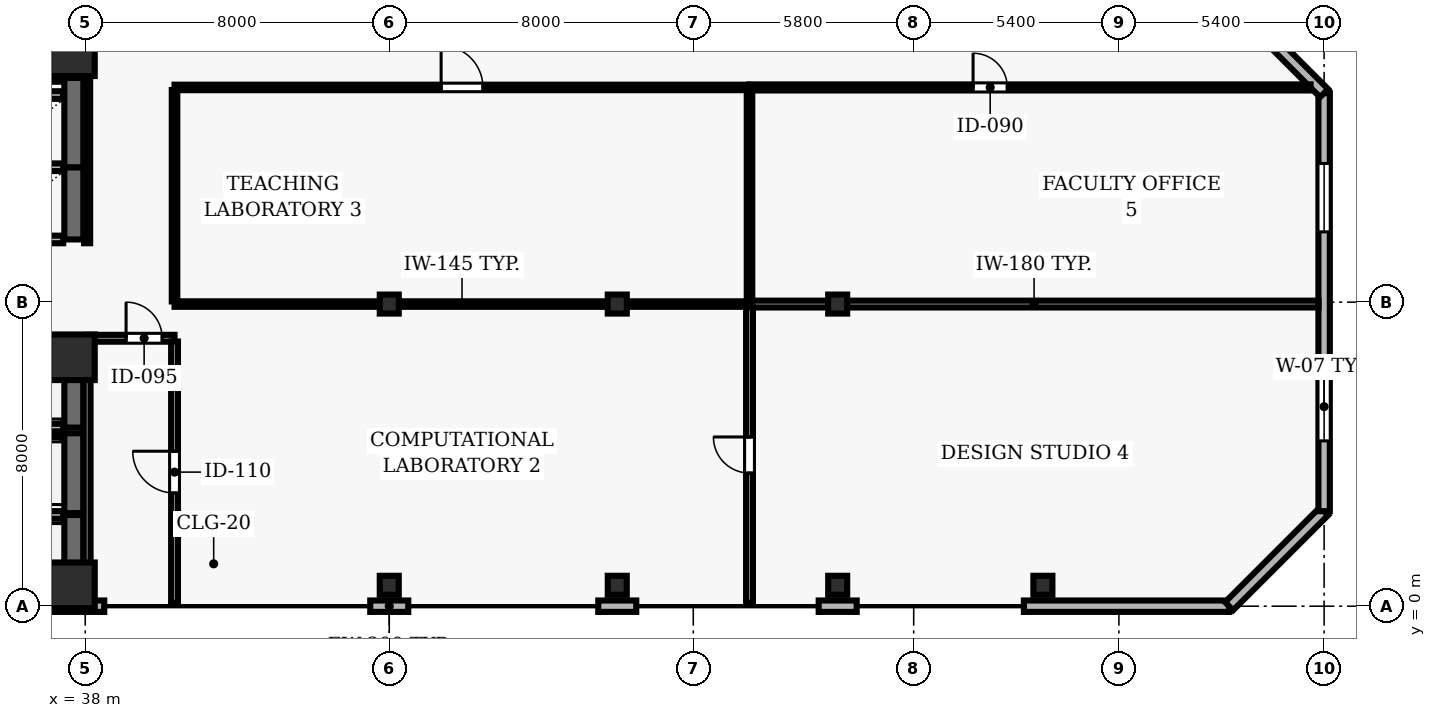
"""IFC4 building model, lengths in metres.
Left out: names, types, materials, properties, quantities, classifications, styles, units other than length and angle.
Written with IfcOpenShell. Run it as: python <this file> out.ifc"""

import sys

from ifc_helpers import new_model, si_unit, direction, frame, frame_2d, origin, origin_2d, place, context, subcontext, project, spatial, rectangle, hollow_rectangle, extrude, element, fill, save


model = new_model("IFC4")
c1 = context("Model", 3, precision=1e-05, world=origin(), true_north=direction((0.0, 1.0)))
c2 = subcontext(c1, "Body", "Model", "MODEL_VIEW")
j1 = project(units=[si_unit("LENGTHUNIT", "METRE"), si_unit("PLANEANGLEUNIT", "RADIAN")], contexts=[c1])
p1 = place(None, origin())
s1 = spatial("IfcSite", under=j1, at=p1, CompositionType="ELEMENT")
p2 = place(p1, origin())
s2 = spatial("IfcBuilding", under=s1, at=p2, CompositionType="ELEMENT")
p3 = place(p2, frame((0.0, 0.0, 119.0)))
s3 = spatial("IfcBuildingStorey", under=s2, at=p3, CompositionType="ELEMENT", Elevation=119.0)
for number, where, z_axis, x_axis in (
    (1, (37.65, 0.55, 0.0), (0.0, 0.0, 1.0), (1.0, 0.0, 0.0)),
    (2, (37.65, 6.55, 0.0), (0.0, 0.0, 1.0), (1.0, 0.0, 0.0)),
    (3, (37.65, 14.55, 0.0), (0.0, 0.0, 1.0), (1.0, 0.0, 0.0)),
):
    element("IfcColumn", number, at=place(p3, frame(where, z_axis=z_axis, x_axis=x_axis)), inside=s3, PredefinedType="COLUMN", context=c2, shape_type="SweptSolid", body=[
        extrude(rectangle(XDim=1.2, YDim=1.2, at=origin_2d()), origin(), (0.0, 0.0, 1.0), 3.9),
    ])
for number, where, z_axis, x_axis in (
    (4, (46.0, 0.55, 0.0), (0.0, 0.0, 1.0), (1.0, 0.0, 0.0)),
    (5, (46.0, 7.95, 0.0), (0.0, 0.0, 1.0), (1.0, 0.0, 0.0)),
    (6, (52.0, 0.55, 0.0), (0.0, 0.0, 1.0), (1.0, 0.0, 0.0)),
    (7, (52.0, 7.95, 0.0), (0.0, 0.0, 1.0), (1.0, 0.0, 0.0)),
    (8, (57.8, 0.55, 0.0), (0.0, 0.0, 1.0), (1.0, 0.0, 0.0)),
    (9, (57.8, 7.95, 0.0), (0.0, 0.0, 1.0), (1.0, 0.0, 0.0)),
    (10, (63.2, 0.55, 0.0), (0.0, 0.0, 1.0), (1.0, 0.0, 0.0)),
):
    element("IfcColumn", number, at=place(p3, frame(where, z_axis=z_axis, x_axis=x_axis)), inside=s3, PredefinedType="COLUMN", context=c2, shape_type="SweptSolid", body=[
        extrude(hollow_rectangle(XDim=0.5, YDim=0.5, WallThickness=0.025, at=origin_2d()), origin(), (0.0, 0.0, 1.0), 3.9),
    ])
p4 = place(p3, frame((30.9, 0.0, 0.0), z_axis=(0.0, 0.0, 1.0), x_axis=(1.0, 0.0, 0.0)))
e11 = element("IfcWall", 11, at=p4, inside=s3, PredefinedType="SOLIDWALL", context=c2, shape_type="SweptSolid", body=[
    extrude(rectangle(XDim=7.6, YDim=0.3, at=frame_2d((3.8, 0.0))), origin(), (0.0, 0.0, 1.0), 3.69),
])
for number, where, z_axis, x_axis in (
    (12, (45.5, 0.0, 0.0), (0.0, 0.0, 1.0), (1.0, 0.0, 0.0)),
    (13, (51.5, 0.0, 0.0), (0.0, 0.0, 1.0), (1.0, 0.0, 0.0)),
    (14, (57.3, 0.0, 0.0), (0.0, 0.0, 1.0), (1.0, 0.0, 0.0)),
):
    element("IfcWall", number, at=place(p3, frame(where, z_axis=z_axis, x_axis=x_axis)), inside=s3, PredefinedType="SOLIDWALL", context=c2, shape_type="SweptSolid", body=[
        extrude(rectangle(XDim=1.0, YDim=0.3, at=frame_2d((0.5, 0.0))), origin(), (0.0, 0.0, 1.0), 3.69),
    ])
p5 = place(p3, frame((62.7, 0.0, 0.0), z_axis=(0.0, 0.0, 1.0), x_axis=(1.0, 0.0, 0.0)))
e15 = element("IfcWall", 15, at=p5, inside=s3, PredefinedType="SOLIDWALL", context=c2, shape_type="SweptSolid", body=[
    extrude(rectangle(XDim=5.4, YDim=0.3, at=frame_2d((2.7, 0.0))), origin(), (0.0, 0.0, 1.0), 3.69),
])
p6 = place(p3, frame((68.1, 0.0, 0.0), z_axis=(0.0, 0.0, 1.0), x_axis=(0.707106781187, 0.707106781187, 0.0)))
e16 = element("IfcWall", 16, at=p6, inside=s3, PredefinedType="SOLIDWALL", context=c2, shape_type="SweptSolid", body=[
    extrude(rectangle(XDim=3.536, YDim=0.3, at=frame_2d((1.768, 0.0))), origin(), (0.0, 0.0, 1.0), 3.69),
])
p7 = place(p3, frame((70.6, 2.5, 0.0), z_axis=(0.0, 0.0, 1.0), x_axis=(0.0, 1.0, 0.0)))
e17 = element("IfcWall", 17, at=p7, inside=s3, PredefinedType="SOLIDWALL", context=c2, shape_type="SweptSolid", body=[
    extrude(rectangle(XDim=11.0, YDim=0.3, at=frame_2d((5.5, 0.0))), origin(), (0.0, 0.0, 1.0), 3.69),
])
p8 = place(p7, frame((1.85, 0.0, 0.9)))
e18 = element("IfcOpeningElement", 18, at=p8, cuts=e17, PredefinedType="OPENING", context=c2, shape_type="SweptSolid", body=[
    extrude(rectangle(XDim=1.8, YDim=1.8, at=frame_2d((0.9, 0.9))), frame((0.0, 0.16, 0.0), z_axis=(0.0, -1.0, 0.0), x_axis=(1.0, 0.0, 0.0)), (0.0, 0.0, 1.0), 0.32),
])
p9 = place(p7, frame((7.35, 0.0, 0.9)))
e19 = element("IfcOpeningElement", 19, at=p9, cuts=e17, PredefinedType="OPENING", context=c2, shape_type="SweptSolid", body=[
    extrude(rectangle(XDim=1.8, YDim=1.8, at=frame_2d((0.9, 0.9))), frame((0.0, 0.16, 0.0), z_axis=(0.0, -1.0, 0.0), x_axis=(1.0, 0.0, 0.0)), (0.0, 0.0, 1.0), 0.32),
])
p10 = place(p3, frame((70.6, 13.5, 0.0), z_axis=(0.0, 0.0, 1.0), x_axis=(-0.707106781187, 0.707106781187, 0.0)))
e20 = element("IfcWall", 20, at=p10, inside=s3, PredefinedType="SOLIDWALL", context=c2, shape_type="SweptSolid", body=[
    extrude(rectangle(XDim=3.536, YDim=0.3, at=frame_2d((1.768, 0.0))), origin(), (0.0, 0.0, 1.0), 3.69),
])
p11 = place(p3, frame((37.7, 0.3, 0.0), z_axis=(0.0, 0.0, 1.0), x_axis=(0.0, 1.0, 0.0)))
e21 = element("IfcWall", 21, at=p11, inside=s3, PredefinedType="SHEAR", context=c2, shape_type="SweptSolid", body=[
    extrude(rectangle(XDim=2.1, YDim=0.5, at=frame_2d((1.05, 0.0))), origin(), (0.0, 0.0, 1.0), 3.69),
])
for number, where, z_axis, x_axis in (
    (22, (35.28, 0.3, 0.0), (0.0, 0.0, 1.0), (1.0, 0.0, 0.0)),
    (23, (37.42, 2.4, 0.0), (0.0, 0.0, 1.0), (-1.0, 0.0, 0.0)),
):
    element("IfcWall", number, at=place(p3, frame(where, z_axis=z_axis, x_axis=x_axis)), inside=s3, PredefinedType="SOLIDWALL", context=c2, shape_type="SweptSolid", body=[
        extrude(rectangle(XDim=2.14, YDim=0.2, at=frame_2d((1.07, 0.0))), origin(), (0.0, 0.0, 1.0), 3.69),
    ])
p12 = place(p3, frame((37.7, 2.45, 0.0), z_axis=(0.0, 0.0, 1.0), x_axis=(0.0, 1.0, 0.0)))
e24 = element("IfcWall", 24, at=p12, inside=s3, PredefinedType="SHEAR", context=c2, shape_type="SweptSolid", body=[
    extrude(rectangle(XDim=2.1, YDim=0.5, at=frame_2d((1.05, 0.0))), origin(), (0.0, 0.0, 1.0), 3.69),
])
p13 = place(p3, frame((37.42, 4.55, 0.0), z_axis=(0.0, 0.0, 1.0), x_axis=(-1.0, 0.0, 0.0)))
e25 = element("IfcWall", 25, at=p13, inside=s3, PredefinedType="SOLIDWALL", context=c2, shape_type="SweptSolid", body=[
    extrude(rectangle(XDim=2.14, YDim=0.2, at=frame_2d((1.07, 0.0))), origin(), (0.0, 0.0, 1.0), 3.69),
])
p14 = place(p3, frame((37.7, 4.7, 0.0), z_axis=(0.0, 0.0, 1.0), x_axis=(0.0, 1.0, 0.0)))
e26 = element("IfcWall", 26, at=p14, inside=s3, PredefinedType="SHEAR", context=c2, shape_type="SweptSolid", body=[
    extrude(rectangle(XDim=2.25, YDim=0.5, at=frame_2d((1.125, 0.0))), origin(), (0.0, 0.0, 1.0), 3.69),
])
for number, where, z_axis, x_axis in (
    (27, (35.28, 4.7, 0.0), (0.0, 0.0, 1.0), (1.0, 0.0, 0.0)),
    (28, (37.42, 6.95, 0.0), (0.0, 0.0, 1.0), (-1.0, 0.0, 0.0)),
):
    element("IfcWall", number, at=place(p3, frame(where, z_axis=z_axis, x_axis=x_axis)), inside=s3, PredefinedType="SOLIDWALL", context=c2, shape_type="SweptSolid", body=[
        extrude(rectangle(XDim=2.14, YDim=0.2, at=frame_2d((1.07, 0.0))), origin(), (0.0, 0.0, 1.0), 3.69),
    ])
p15 = place(p3, frame((37.7, 9.65, 0.0), z_axis=(0.0, 0.0, 1.0), x_axis=(0.0, 1.0, 0.0)))
e29 = element("IfcWall", 29, at=p15, inside=s3, PredefinedType="SHEAR", context=c2, shape_type="SweptSolid", body=[
    extrude(rectangle(XDim=1.9, YDim=0.5, at=frame_2d((0.95, 0.0))), origin(), (0.0, 0.0, 1.0), 3.69),
])
for number, where, z_axis, x_axis in (
    (30, (35.28, 9.65, 0.0), (0.0, 0.0, 1.0), (1.0, 0.0, 0.0)),
    (31, (37.42, 11.55, 0.0), (0.0, 0.0, 1.0), (-1.0, 0.0, 0.0)),
):
    element("IfcWall", number, at=place(p3, frame(where, z_axis=z_axis, x_axis=x_axis)), inside=s3, PredefinedType="SOLIDWALL", context=c2, shape_type="SweptSolid", body=[
        extrude(rectangle(XDim=2.14, YDim=0.2, at=frame_2d((1.07, 0.0))), origin(), (0.0, 0.0, 1.0), 3.69),
    ])
p16 = place(p3, frame((37.7, 11.55, 0.0), z_axis=(0.0, 0.0, 1.0), x_axis=(0.0, 1.0, 0.0)))
e32 = element("IfcWall", 32, at=p16, inside=s3, PredefinedType="SHEAR", context=c2, shape_type="SweptSolid", body=[
    extrude(rectangle(XDim=2.35, YDim=0.5, at=frame_2d((1.175, 0.0))), origin(), (0.0, 0.0, 1.0), 3.69),
])
p17 = place(p3, frame((37.42, 13.45, 0.0), z_axis=(0.0, 0.0, 1.0), x_axis=(-1.0, 0.0, 0.0)))
e33 = element("IfcWall", 33, at=p17, inside=s3, PredefinedType="SOLIDWALL", context=c2, shape_type="SweptSolid", body=[
    extrude(rectangle(XDim=2.14, YDim=0.2, at=frame_2d((1.07, 0.0))), origin(), (0.0, 0.0, 1.0), 3.69),
])
p18 = place(p3, frame((37.7, 13.9, 0.0), z_axis=(0.0, 0.0, 1.0), x_axis=(0.0, 1.0, 0.0)))
e34 = element("IfcWall", 34, at=p18, inside=s3, PredefinedType="SHEAR", context=c2, shape_type="SweptSolid", body=[
    extrude(rectangle(XDim=1.85, YDim=0.5, at=frame_2d((0.925, 0.0))), origin(), (0.0, 0.0, 1.0), 3.69),
])
p19 = place(p3, frame((35.28, 13.9, 0.0), z_axis=(0.0, 0.0, 1.0), x_axis=(1.0, 0.0, 0.0)))
e35 = element("IfcWall", 35, at=p19, inside=s3, PredefinedType="SOLIDWALL", context=c2, shape_type="SweptSolid", body=[
    extrude(rectangle(XDim=2.14, YDim=0.2, at=frame_2d((1.07, 0.0))), origin(), (0.0, 0.0, 1.0), 3.69),
])
p20 = place(p3, frame((38.05, 7.05, 0.0), z_axis=(0.0, 0.0, 1.0), x_axis=(1.0, 0.0, 0.0)))
e36 = element("IfcWall", 36, at=p20, inside=s3, PredefinedType="PARTITIONING", context=c2, shape_type="SweptSolid", body=[
    extrude(rectangle(XDim=2.3, YDim=0.18, at=frame_2d((1.15, 0.0))), origin(), (0.0, 0.0, 1.0), 3.69),
])
p21 = place(p20, frame((1.025, 0.0, 0.0)))
e37 = element("IfcOpeningElement", 37, at=p21, cuts=e36, PredefinedType="OPENING", context=c2, shape_type="SweptSolid", body=[
    extrude(rectangle(XDim=0.95, YDim=2.1, at=frame_2d((0.475, 1.05))), frame((0.0, 0.1, 0.0), z_axis=(0.0, -1.0, 0.0), x_axis=(1.0, 0.0, 0.0)), (0.0, 0.0, 1.0), 0.2),
])
p22 = place(p3, frame((40.35, 13.65, 0.0), z_axis=(0.0, 0.0, 1.0), x_axis=(1.0, 0.0, 0.0)))
e38 = element("IfcWall", 38, at=p22, inside=s3, PredefinedType="PARTITIONING", context=c2, shape_type="SweptSolid", body=[
    extrude(rectangle(XDim=15.13, YDim=0.145, at=frame_2d((7.565, 0.0))), origin(), (0.0, 0.0, 1.0), 3.69),
])
p23 = place(p22, frame((7.015, 0.0, 0.0)))
e39 = element("IfcOpeningElement", 39, at=p23, cuts=e38, PredefinedType="OPENING", context=c2, shape_type="SweptSolid", body=[
    extrude(rectangle(XDim=1.1, YDim=2.15, at=frame_2d((0.55, 1.075))), frame((0.0, 0.083, 0.0), z_axis=(0.0, -1.0, 0.0), x_axis=(1.0, 0.0, 0.0)), (0.0, 0.0, 1.0), 0.165),
])
p24 = place(p3, frame((55.48, 7.95, 0.0), z_axis=(0.0, 0.0, 1.0), x_axis=(-1.0, 0.0, 0.0)))
e40 = element("IfcWall", 40, at=p24, inside=s3, PredefinedType="PARTITIONING", context=c2, shape_type="SweptSolid", body=[
    extrude(rectangle(XDim=15.13, YDim=0.145, at=frame_2d((7.565, 0.0))), origin(), (0.0, 0.0, 1.0), 3.074),
])
p25 = place(p3, frame((55.48, 13.65, 0.0), z_axis=(0.0, 0.0, 1.0), x_axis=(1.0, 0.0, 0.0)))
e41 = element("IfcWall", 41, at=p25, inside=s3, PredefinedType="PARTITIONING", context=c2, shape_type="SweptSolid", body=[
    extrude(rectangle(XDim=14.765, YDim=0.16, at=frame_2d((7.383, 0.0))), origin(), (0.0, 0.0, 1.0), 3.69),
])
p26 = place(p25, frame((5.883, 0.0, 0.0)))
e42 = element("IfcOpeningElement", 42, at=p26, cuts=e41, PredefinedType="OPENING", context=c2, shape_type="SweptSolid", body=[
    extrude(rectangle(XDim=0.9, YDim=2.1, at=frame_2d((0.45, 1.05))), frame((0.0, 0.09, 0.0), z_axis=(0.0, -1.0, 0.0), x_axis=(1.0, 0.0, 0.0)), (0.0, 0.0, 1.0), 0.18),
])
p27 = place(p3, frame((70.455, 7.95, 0.0), z_axis=(0.0, 0.0, 1.0), x_axis=(-1.0, 0.0, 0.0)))
e43 = element("IfcWall", 43, at=p27, inside=s3, PredefinedType="PARTITIONING", context=c2, shape_type="SweptSolid", body=[
    extrude(rectangle(XDim=14.975, YDim=0.18, at=frame_2d((7.488, 0.0))), origin(), (0.0, 0.0, 1.0), 3.074),
])
p28 = place(p3, frame((38.05, 6.965, 0.0), z_axis=(0.0, 0.0, 1.0), x_axis=(0.0, -1.0, 0.0)))
e44 = element("IfcWall", 44, at=p28, inside=s3, PredefinedType="PARTITIONING", context=c2, shape_type="SweptSolid", body=[
    extrude(rectangle(XDim=6.82, YDim=0.18, at=frame_2d((3.41, 0.0))), origin(), (0.0, 0.0, 1.0), 3.074),
])
p29 = place(p3, frame((38.05, 15.925, 0.0), z_axis=(0.0, 0.0, 1.0), x_axis=(0.0, -1.0, 0.0)))
e45 = element("IfcWall", 45, at=p29, inside=s3, PredefinedType="PARTITIONING", context=c2, shape_type="SweptSolid", body=[
    extrude(rectangle(XDim=6.375, YDim=0.16, at=frame_2d((3.188, 0.0))), origin(), (0.0, 0.0, 1.0), 3.074),
])
p30 = place(p3, frame((40.35, 0.09, 0.0), z_axis=(0.0, 0.0, 1.0), x_axis=(0.0, 1.0, 0.0)))
e46 = element("IfcWall", 46, at=p30, inside=s3, PredefinedType="PARTITIONING", context=c2, shape_type="SweptSolid", body=[
    extrude(rectangle(XDim=6.875, YDim=0.18, at=frame_2d((3.438, 0.0))), origin(), (0.0, 0.0, 1.0), 3.69),
])
p31 = place(p30, frame((2.888, 0.0, 0.0)))
e47 = element("IfcOpeningElement", 47, at=p31, cuts=e46, PredefinedType="OPENING", context=c2, shape_type="SweptSolid", body=[
    extrude(rectangle(XDim=1.1, YDim=2.15, at=frame_2d((0.55, 1.075))), frame((0.0, 0.1, 0.0), z_axis=(0.0, -1.0, 0.0), x_axis=(1.0, 0.0, 0.0)), (0.0, 0.0, 1.0), 0.2),
])
p32 = place(p3, frame((40.35, 8.018, 0.0), z_axis=(0.0, 0.0, 1.0), x_axis=(0.0, 1.0, 0.0)))
e48 = element("IfcWall", 48, at=p32, inside=s3, PredefinedType="PARTITIONING", context=c2, shape_type="SweptSolid", body=[
    extrude(rectangle(XDim=5.564, YDim=0.145, at=frame_2d((2.782, 0.0))), origin(), (0.0, 0.0, 1.0), 3.69),
])
p33 = place(p3, frame((55.48, 0.09, 0.0), z_axis=(0.0, 0.0, 1.0), x_axis=(0.0, 1.0, 0.0)))
e49 = element("IfcWall", 49, at=p33, inside=s3, PredefinedType="PARTITIONING", context=c2, shape_type="SweptSolid", body=[
    extrude(rectangle(XDim=7.775, YDim=0.18, at=frame_2d((3.887, 0.0))), origin(), (0.0, 0.0, 1.0), 3.69),
])
p34 = place(p33, frame((3.413, 0.0, 0.0)))
e50 = element("IfcOpeningElement", 50, at=p34, cuts=e49, PredefinedType="OPENING", context=c2, shape_type="SweptSolid", body=[
    extrude(rectangle(XDim=0.95, YDim=2.1, at=frame_2d((0.475, 1.05))), frame((0.0, 0.1, 0.0), z_axis=(0.0, -1.0, 0.0), x_axis=(1.0, 0.0, 0.0)), (0.0, 0.0, 1.0), 0.2),
])
p35 = place(p3, frame((55.48, 8.035, 0.0), z_axis=(0.0, 0.0, 1.0), x_axis=(0.0, 1.0, 0.0)))
e51 = element("IfcWall", 51, at=p35, inside=s3, PredefinedType="PARTITIONING", context=c2, shape_type="SweptSolid", body=[
    extrude(rectangle(XDim=5.54, YDim=0.145, at=frame_2d((2.77, 0.0))), origin(), (0.0, 0.0, 1.0), 3.69),
])
p36 = place(p8, origin())
e52 = element("IfcWindow", 52, at=p36, inside=s3, PartitioningType="SINGLE_PANEL", PredefinedType="WINDOW", context=c2, shape_type="SweptSolid", body=[
    extrude(rectangle(XDim=1.8, YDim=1.8, at=frame_2d((0.9, 0.9))), frame((0.0, 0.03, 0.0), z_axis=(0.0, -1.0, 0.0), x_axis=(1.0, 0.0, 0.0)), (0.0, 0.0, 1.0), 0.06),
])
fill(e18, e52)
p37 = place(p9, origin())
e53 = element("IfcWindow", 53, at=p37, inside=s3, PartitioningType="SINGLE_PANEL", PredefinedType="WINDOW", context=c2, shape_type="SweptSolid", body=[
    extrude(rectangle(XDim=1.8, YDim=1.8, at=frame_2d((0.9, 0.9))), frame((0.0, 0.03, 0.0), z_axis=(0.0, -1.0, 0.0), x_axis=(1.0, 0.0, 0.0)), (0.0, 0.0, 1.0), 0.06),
])
fill(e19, e53)
p38 = place(p21, origin())
e54 = element("IfcDoor", 54, at=p38, inside=s3, OperationType="SINGLE_SWING_LEFT", PredefinedType="DOOR", context=c2, shape_type="SweptSolid", body=[
    extrude(rectangle(XDim=0.95, YDim=2.1, at=frame_2d((0.475, 1.05))), frame((0.0, 0.025, 0.0), z_axis=(0.0, -1.0, 0.0), x_axis=(1.0, 0.0, 0.0)), (0.0, 0.0, 1.0), 0.05),
])
fill(e37, e54)
p39 = place(p31, origin())
e55 = element("IfcDoor", 55, at=p39, inside=s3, OperationType="SINGLE_SWING_RIGHT", PredefinedType="DOOR", context=c2, shape_type="SweptSolid", body=[
    extrude(rectangle(XDim=1.1, YDim=2.15, at=frame_2d((0.55, 1.075))), frame((0.0, 0.025, 0.0), z_axis=(0.0, -1.0, 0.0), x_axis=(1.0, 0.0, 0.0)), (0.0, 0.0, 1.0), 0.05),
])
fill(e47, e55)
p40 = place(p23, origin())
e56 = element("IfcDoor", 56, at=p40, inside=s3, OperationType="SINGLE_SWING_LEFT", PredefinedType="DOOR", context=c2, shape_type="SweptSolid", body=[
    extrude(rectangle(XDim=1.1, YDim=2.15, at=frame_2d((0.55, 1.075))), frame((0.0, 0.025, 0.0), z_axis=(0.0, -1.0, 0.0), x_axis=(1.0, 0.0, 0.0)), (0.0, 0.0, 1.0), 0.05),
])
fill(e39, e56)
p41 = place(p34, origin())
e57 = element("IfcDoor", 57, at=p41, inside=s3, OperationType="SINGLE_SWING_RIGHT", PredefinedType="DOOR", context=c2, shape_type="SweptSolid", body=[
    extrude(rectangle(XDim=0.95, YDim=2.1, at=frame_2d((0.475, 1.05))), frame((0.0, 0.025, 0.0), z_axis=(0.0, -1.0, 0.0), x_axis=(1.0, 0.0, 0.0)), (0.0, 0.0, 1.0), 0.05),
])
fill(e50, e57)
p42 = place(p26, origin())
e58 = element("IfcDoor", 58, at=p42, inside=s3, OperationType="SINGLE_SWING_LEFT", PredefinedType="DOOR", context=c2, shape_type="SweptSolid", body=[
    extrude(rectangle(XDim=0.9, YDim=2.1, at=frame_2d((0.45, 1.05))), frame((0.0, 0.025, 0.0), z_axis=(0.0, -1.0, 0.0), x_axis=(1.0, 0.0, 0.0)), (0.0, 0.0, 1.0), 0.05),
])
fill(e42, e58)
save(model, sys.argv[1])
